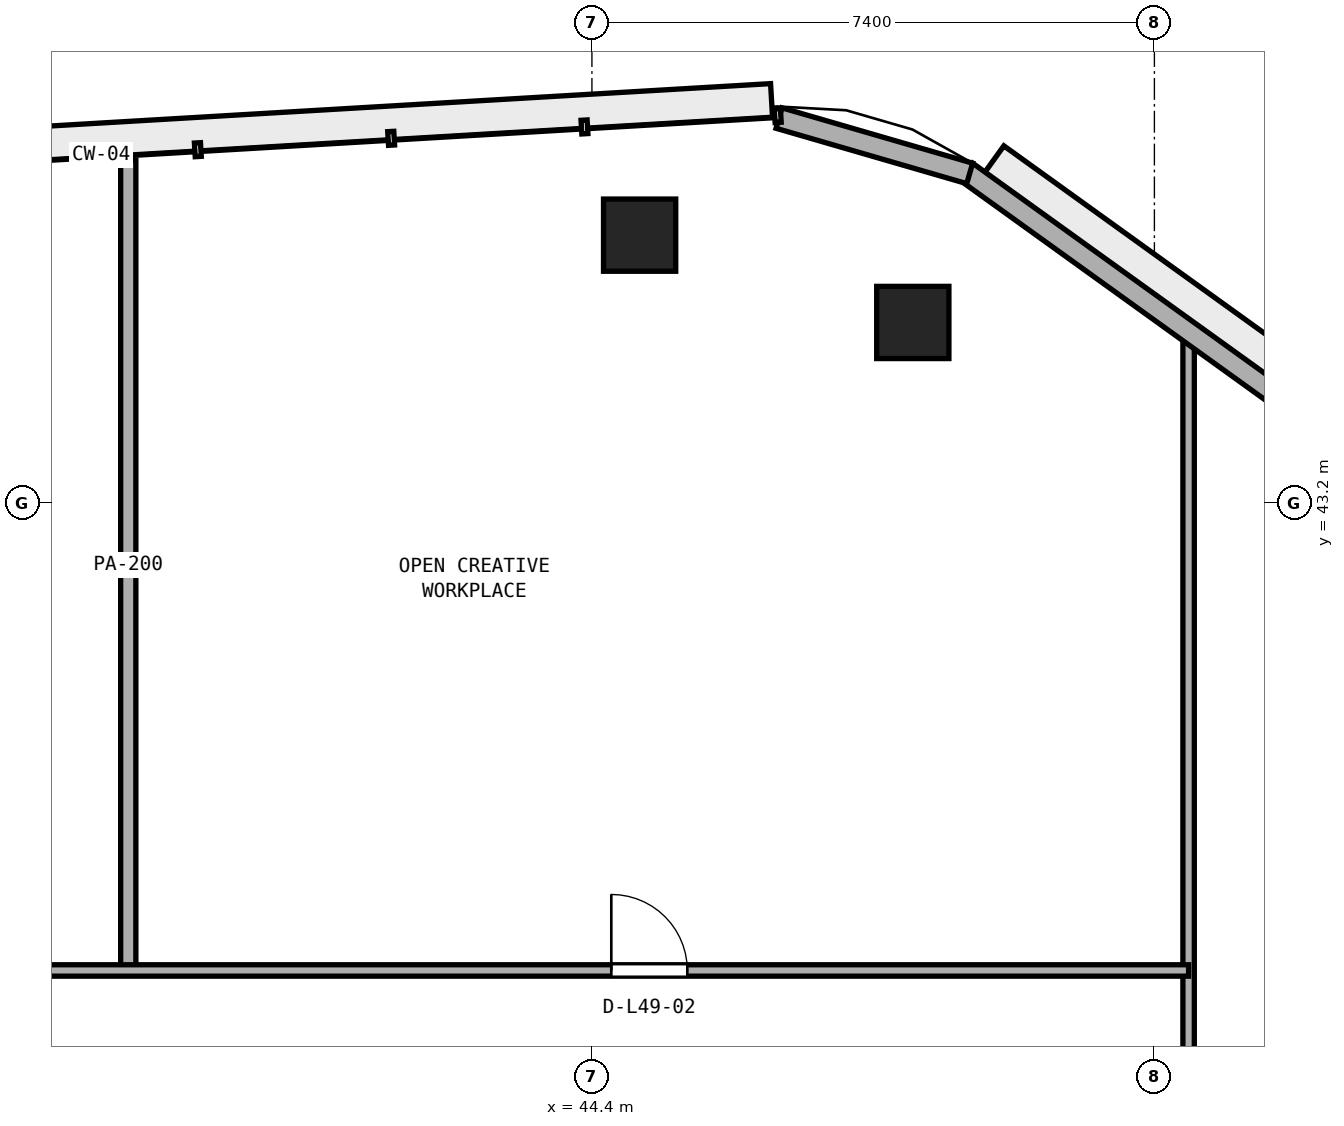
"""IFC4 building model, lengths in metres.
Left out: names, types, materials, properties, quantities, classifications, styles, units other than length and angle.
Written with IfcOpenShell. Run it as: python <this file> out.ifc"""

import sys

from ifc_helpers import new_model, si_unit, direction, frame, frame_2d, origin, origin_2d, place, context, subcontext, project, spatial, rectangle, extrude, element, fill, save


model = new_model("IFC4")
c1 = context("Model", 3, precision=1e-05, world=origin(), true_north=direction((0.0, 1.0)))
c2 = subcontext(c1, "Body", "Model", "MODEL_VIEW")
j1 = project(units=[si_unit("LENGTHUNIT", "METRE"), si_unit("PLANEANGLEUNIT", "RADIAN")], contexts=[c1])
p1 = place(None, origin())
s1 = spatial("IfcSite", under=j1, at=p1, CompositionType="ELEMENT")
p2 = place(p1, origin())
s2 = spatial("IfcBuilding", under=s1, at=p2, CompositionType="ELEMENT")
p3 = place(p2, frame((0.0, 0.0, 193.4)))
s3 = spatial("IfcBuildingStorey", under=s2, at=p3, CompositionType="ELEMENT", Elevation=193.4)
for number, where, z_axis, x_axis in (
    (1, (48.622, 45.575, 0.0), (0.0, 0.0, 1.0), (1.0, 0.0, 0.0)),
    (2, (45.028, 46.724, 0.0), (0.0, 0.0, 1.0), (1.0, 0.0, 0.0)),
):
    element("IfcColumn", number, at=place(p3, frame(where, z_axis=z_axis, x_axis=x_axis)), inside=s3, PredefinedType="COLUMN", context=c2, shape_type="SweptSolid", body=[
        extrude(rectangle(XDim=0.95, YDim=0.95, at=origin_2d()), origin(), (0.0, 0.0, 1.0), 3.8),
    ])
p4 = place(p3, frame((52.25, 26.55, 0.0), z_axis=(0.0, 0.0, 1.0), x_axis=(0.0, 1.0, 0.0)))
e3 = element("IfcWall", 3, at=p4, inside=s3, PredefinedType="PARTITIONING", context=c2, shape_type="SweptSolid", body=[
    extrude(rectangle(XDim=18.936, YDim=0.15, at=frame_2d((9.468, 0.0))), origin(), (0.0, 0.0, 1.0), 3.54),
])
p5 = place(p4, frame((6.825, 0.0, 0.0)))
e4 = element("IfcOpeningElement", 4, at=p5, cuts=e3, PredefinedType="OPENING", context=c2, shape_type="SweptSolid", body=[
    extrude(rectangle(XDim=1.0, YDim=2.12, at=frame_2d((0.5, 1.06))), frame((0.0, 0.085, 0.0), z_axis=(0.0, -1.0, 0.0), x_axis=(1.0, 0.0, 0.0)), (0.0, 0.0, 1.0), 0.17),
])
p6 = place(p3, frame((38.3, 37.05, 0.0), z_axis=(0.0, 0.0, 1.0), x_axis=(0.0, 1.0, 0.0)))
e5 = element("IfcWall", 5, at=p6, inside=s3, PredefinedType="PARTITIONING", context=c2, shape_type="SweptSolid", body=[
    extrude(rectangle(XDim=10.659, YDim=0.2, at=frame_2d((5.33, 0.0))), origin(), (0.0, 0.0, 1.0), 3.54),
])
p7 = place(p3, frame((21.75, 37.05, 0.0), z_axis=(0.0, 0.0, 1.0), x_axis=(1.0, 0.0, 0.0)))
e6 = element("IfcWall", 6, at=p7, inside=s3, PredefinedType="PARTITIONING", context=c2, shape_type="SweptSolid", body=[
    extrude(rectangle(XDim=30.5, YDim=0.15, at=frame_2d((15.25, 0.0))), origin(), (0.0, 0.0, 1.0), 3.54),
])
p8 = place(p7, frame((7.895, 0.0, 0.0)))
e7 = element("IfcOpeningElement", 7, at=p8, cuts=e6, PredefinedType="OPENING", context=c2, shape_type="SweptSolid", body=[
    extrude(rectangle(XDim=1.0, YDim=2.12, at=frame_2d((0.5, 1.06))), frame((0.0, 0.085, 0.0), z_axis=(0.0, -1.0, 0.0), x_axis=(1.0, 0.0, 0.0)), (0.0, 0.0, 1.0), 0.17),
])
p9 = place(p7, frame((22.905, 0.0, 0.0)))
e8 = element("IfcOpeningElement", 8, at=p9, cuts=e6, PredefinedType="OPENING", context=c2, shape_type="SweptSolid", body=[
    extrude(rectangle(XDim=1.0, YDim=2.12, at=frame_2d((0.5, 1.06))), frame((0.0, 0.085, 0.0), z_axis=(0.0, -1.0, 0.0), x_axis=(1.0, 0.0, 0.0)), (0.0, 0.0, 1.0), 0.17),
])
p10 = place(p3, frame((62.054, 38.399, 0.0), z_axis=(0.0, 0.0, 1.0), x_axis=(-0.81172124793, 0.584045045915, 0.0)))
e9 = element("IfcWall", 9, at=p10, inside=s3, PredefinedType="STANDARD", context=c2, shape_type="SweptSolid", body=[
    extrude(rectangle(XDim=15.679, YDim=0.28, at=frame_2d((7.84, 0.0))), origin(), (0.0, 0.0, 1.0), 3.54),
])
p11 = place(p10, frame((1.747, 0.0, 0.9)))
e10 = element("IfcOpeningElement", 10, at=p11, cuts=e9, PredefinedType="OPENING", context=c2, shape_type="SweptSolid", body=[
    extrude(rectangle(XDim=2.4, YDim=1.75, at=frame_2d((1.2, 0.875))), frame((0.0, 0.15, 0.0), z_axis=(0.0, -1.0, 0.0), x_axis=(1.0, 0.0, 0.0)), (0.0, 0.0, 1.0), 0.3),
])
p12 = place(p10, frame((6.64, 0.0, 0.9)))
e11 = element("IfcOpeningElement", 11, at=p12, cuts=e9, PredefinedType="OPENING", context=c2, shape_type="SweptSolid", body=[
    extrude(rectangle(XDim=2.4, YDim=1.75, at=frame_2d((1.2, 0.875))), frame((0.0, 0.15, 0.0), z_axis=(0.0, -1.0, 0.0), x_axis=(1.0, 0.0, 0.0)), (0.0, 0.0, 1.0), 0.3),
])
p13 = place(p3, frame((49.37, 47.536, 0.0), z_axis=(0.0, 0.0, 1.0), x_axis=(-0.960380123045, 0.278693414453, 0.0)))
e12 = element("IfcWall", 12, at=p13, inside=s3, PredefinedType="STANDARD", context=c2, shape_type="SweptSolid", body=[
    extrude(rectangle(XDim=2.612, YDim=0.28, at=frame_2d((1.306, 0.0))), origin(), (0.0, 0.0, 1.0), 3.54),
])
p14 = place(p9, origin())
e13 = element("IfcDoor", 13, at=p14, inside=s3, OperationType="SINGLE_SWING_LEFT", PredefinedType="DOOR", context=c2, shape_type="SweptSolid", body=[
    extrude(rectangle(XDim=1.0, YDim=2.12, at=frame_2d((0.5, 1.06))), frame((0.0, 0.025, 0.0), z_axis=(0.0, -1.0, 0.0), x_axis=(1.0, 0.0, 0.0)), (0.0, 0.0, 1.0), 0.05),
])
fill(e8, e13)
save(model, sys.argv[1])
